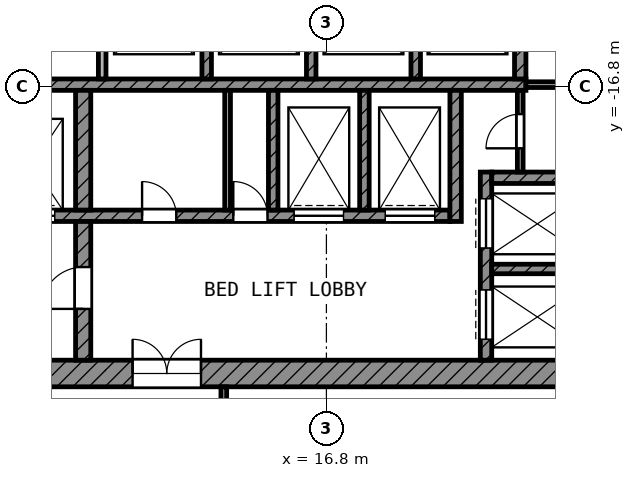
"""IFC4 building model, lengths in metres.
Left out: names, types, materials, properties, quantities, classifications, styles, units other than length and angle.
Written with IfcOpenShell. Run it as: python <this file> out.ifc"""

import sys

from ifc_helpers import new_model, si_unit, direction, frame, frame_2d, origin, place, context, subcontext, project, spatial, rectangle, extrude, element, fill, save


model = new_model("IFC4")
c1 = context("Model", 3, precision=1e-05, world=origin(), true_north=direction((0.0, 1.0)))
c2 = subcontext(c1, "Body", "Model", "MODEL_VIEW")
j1 = project(units=[si_unit("LENGTHUNIT", "METRE"), si_unit("PLANEANGLEUNIT", "RADIAN")], contexts=[c1])
p1 = place(None, origin())
s1 = spatial("IfcSite", under=j1, at=p1, CompositionType="ELEMENT")
p2 = place(p1, origin())
s2 = spatial("IfcBuilding", under=s1, at=p2, CompositionType="ELEMENT")
p3 = place(p2, frame((0.0, 0.0, 328.0)))
s3 = spatial("IfcBuildingStorey", under=s2, at=p3, CompositionType="ELEMENT", Elevation=328.0)
p4 = place(p3, frame((5.4, -24.35, 0.0), z_axis=(0.0, 0.0, 1.0), x_axis=(1.0, 0.0, 0.0)))
e1 = element("IfcWall", 1, at=p4, inside=s3, PredefinedType="SHEAR", context=c2, shape_type="SweptSolid", body=[
    extrude(rectangle(XDim=18.6, YDim=0.7, at=frame_2d((9.3, 0.0))), origin(), (0.0, 0.0, 1.0), 3.78),
])
p5 = place(p4, frame((6.3, 0.0, 0.0)))
e2 = element("IfcOpeningElement", 2, at=p5, cuts=e1, PredefinedType="OPENING", context=c2, shape_type="SweptSolid", body=[
    extrude(rectangle(XDim=1.8, YDim=2.1, at=frame_2d((0.9, 1.05))), frame((0.0, 0.36, 0.0), z_axis=(0.0, -1.0, 0.0), x_axis=(1.0, 0.0, 0.0)), (0.0, 0.0, 1.0), 0.72),
])
p6 = place(p3, frame((5.4, -16.75, 0.0), z_axis=(0.0, 0.0, 1.0), x_axis=(1.0, 0.0, 0.0)))
e3 = element("IfcWall", 3, at=p6, inside=s3, PredefinedType="SHEAR", context=c2, shape_type="SweptSolid", body=[
    extrude(rectangle(XDim=16.65, YDim=0.3, at=frame_2d((8.325, 0.0))), origin(), (0.0, 0.0, 1.0), 3.78),
])
p7 = place(p3, frame((5.4, -20.2, 0.0), z_axis=(0.0, 0.0, 1.0), x_axis=(1.0, 0.0, 0.0)))
e4 = element("IfcWall", 4, at=p7, inside=s3, PredefinedType="SHEAR", context=c2, shape_type="SweptSolid", body=[
    extrude(rectangle(XDim=14.65, YDim=0.3, at=frame_2d((7.325, 0.0))), origin(), (0.0, 0.0, 1.0), 3.78),
])
p8 = place(p7, frame((10.55, 0.0, 0.0)))
e5 = element("IfcOpeningElement", 5, at=p8, cuts=e4, PredefinedType="OPENING", context=c2, shape_type="SweptSolid", body=[
    extrude(rectangle(XDim=1.3, YDim=2.1, at=frame_2d((0.65, 1.05))), frame((0.0, 0.16, 0.0), z_axis=(0.0, -1.0, 0.0), x_axis=(1.0, 0.0, 0.0)), (0.0, 0.0, 1.0), 0.32),
])
p9 = place(p7, frame((12.95, 0.0, 0.0)))
e6 = element("IfcOpeningElement", 6, at=p9, cuts=e4, PredefinedType="OPENING", context=c2, shape_type="SweptSolid", body=[
    extrude(rectangle(XDim=1.3, YDim=2.1, at=frame_2d((0.65, 1.05))), frame((0.0, 0.16, 0.0), z_axis=(0.0, -1.0, 0.0), x_axis=(1.0, 0.0, 0.0)), (0.0, 0.0, 1.0), 0.32),
])
p10 = place(p7, frame((0.55, 0.0, 0.0)))
e7 = element("IfcOpeningElement", 7, at=p10, cuts=e4, PredefinedType="OPENING", context=c2, shape_type="SweptSolid", body=[
    extrude(rectangle(XDim=1.3, YDim=2.1, at=frame_2d((0.65, 1.05))), frame((0.0, 0.16, 0.0), z_axis=(0.0, -1.0, 0.0), x_axis=(1.0, 0.0, 0.0)), (0.0, 0.0, 1.0), 0.32),
])
p11 = place(p7, frame((2.95, 0.0, 0.0)))
e8 = element("IfcOpeningElement", 8, at=p11, cuts=e4, PredefinedType="OPENING", context=c2, shape_type="SweptSolid", body=[
    extrude(rectangle(XDim=1.3, YDim=2.1, at=frame_2d((0.65, 1.05))), frame((0.0, 0.16, 0.0), z_axis=(0.0, -1.0, 0.0), x_axis=(1.0, 0.0, 0.0)), (0.0, 0.0, 1.0), 0.32),
])
p12 = place(p7, frame((6.55, 0.0, 0.0)))
e9 = element("IfcOpeningElement", 9, at=p12, cuts=e4, PredefinedType="OPENING", context=c2, shape_type="SweptSolid", body=[
    extrude(rectangle(XDim=0.9, YDim=2.1, at=frame_2d((0.45, 1.05))), frame((0.0, 0.16, 0.0), z_axis=(0.0, -1.0, 0.0), x_axis=(1.0, 0.0, 0.0)), (0.0, 0.0, 1.0), 0.32),
])
p13 = place(p7, frame((8.95, 0.0, 0.0)))
e10 = element("IfcOpeningElement", 10, at=p13, cuts=e4, PredefinedType="OPENING", context=c2, shape_type="SweptSolid", body=[
    extrude(rectangle(XDim=0.9, YDim=2.1, at=frame_2d((0.45, 1.05))), frame((0.0, 0.16, 0.0), z_axis=(0.0, -1.0, 0.0), x_axis=(1.0, 0.0, 0.0)), (0.0, 0.0, 1.0), 0.32),
])
p14 = place(p3, frame((10.4, -24.0, 0.0), z_axis=(0.0, 0.0, 1.0), x_axis=(0.0, 1.0, 0.0)))
e11 = element("IfcWall", 11, at=p14, inside=s3, PredefinedType="SHEAR", context=c2, shape_type="SweptSolid", body=[
    extrude(rectangle(XDim=3.65, YDim=0.4, at=frame_2d((1.825, 0.0))), origin(), (0.0, 0.0, 1.0), 3.78),
])
p15 = place(p14, frame((1.35, 0.0, 0.0)))
e12 = element("IfcOpeningElement", 12, at=p15, cuts=e11, PredefinedType="OPENING", context=c2, shape_type="SweptSolid", body=[
    extrude(rectangle(XDim=1.1, YDim=2.1, at=frame_2d((0.55, 1.05))), frame((0.0, 0.21, 0.0), z_axis=(0.0, -1.0, 0.0), x_axis=(1.0, 0.0, 0.0)), (0.0, 0.0, 1.0), 0.42),
])
p16 = place(p3, frame((10.4, -20.05, 0.0), z_axis=(0.0, 0.0, 1.0), x_axis=(0.0, 1.0, 0.0)))
e13 = element("IfcWall", 13, at=p16, inside=s3, PredefinedType="SHEAR", context=c2, shape_type="SweptSolid", body=[
    extrude(rectangle(XDim=3.15, YDim=0.4, at=frame_2d((1.575, 0.0))), origin(), (0.0, 0.0, 1.0), 3.78),
])
p17 = place(p3, frame((20.2, -20.35, 0.0), z_axis=(0.0, 0.0, 1.0), x_axis=(0.0, 1.0, 0.0)))
e14 = element("IfcWall", 14, at=p17, inside=s3, PredefinedType="SHEAR", context=c2, shape_type="SweptSolid", body=[
    extrude(rectangle(XDim=3.45, YDim=0.3, at=frame_2d((1.725, 0.0))), origin(), (0.0, 0.0, 1.0), 3.78),
])
p18 = place(p3, frame((21.9, -16.6, 0.0), z_axis=(0.0, 0.0, 1.0), x_axis=(0.0, 1.0, 0.0)))
e15 = element("IfcWall", 15, at=p18, inside=s3, PredefinedType="SHEAR", context=c2, shape_type="SweptSolid", body=[
    extrude(rectangle(XDim=2.35, YDim=0.3, at=frame_2d((1.175, 0.0))), origin(), (0.0, 0.0, 1.0), 3.78),
])
p19 = place(p3, frame((21.15, -19.2, 0.0), z_axis=(0.0, 0.0, 1.0), x_axis=(1.0, 0.0, 0.0)))
e16 = element("IfcWall", 16, at=p19, inside=s3, PredefinedType="SHEAR", context=c2, shape_type="SweptSolid", body=[
    extrude(rectangle(XDim=2.85, YDim=0.3, at=frame_2d((1.425, 0.0))), origin(), (0.0, 0.0, 1.0), 3.78),
])
p20 = place(p3, frame((21.0, -24.0, 0.0), z_axis=(0.0, 0.0, 1.0), x_axis=(0.0, 1.0, 0.0)))
e17 = element("IfcWall", 17, at=p20, inside=s3, PredefinedType="SHEAR", context=c2, shape_type="SweptSolid", body=[
    extrude(rectangle(XDim=4.95, YDim=0.3, at=frame_2d((2.475, 0.0))), origin(), (0.0, 0.0, 1.0), 3.78),
])
p21 = place(p20, frame((2.95, 0.0, 0.0)))
e18 = element("IfcOpeningElement", 18, at=p21, cuts=e17, PredefinedType="OPENING", context=c2, shape_type="SweptSolid", body=[
    extrude(rectangle(XDim=1.3, YDim=2.1, at=frame_2d((0.65, 1.05))), frame((0.0, 0.16, 0.0), z_axis=(0.0, -1.0, 0.0), x_axis=(1.0, 0.0, 0.0)), (0.0, 0.0, 1.0), 0.32),
])
p22 = place(p20, frame((0.55, 0.0, 0.0)))
e19 = element("IfcOpeningElement", 19, at=p22, cuts=e17, PredefinedType="OPENING", context=c2, shape_type="SweptSolid", body=[
    extrude(rectangle(XDim=1.3, YDim=2.1, at=frame_2d((0.65, 1.05))), frame((0.0, 0.16, 0.0), z_axis=(0.0, -1.0, 0.0), x_axis=(1.0, 0.0, 0.0)), (0.0, 0.0, 1.0), 0.32),
])
p23 = place(p3, frame((21.15, -21.6, 0.0), z_axis=(0.0, 0.0, 1.0), x_axis=(1.0, 0.0, 0.0)))
e20 = element("IfcWall", 20, at=p23, inside=s3, PredefinedType="SHEAR", context=c2, shape_type="SweptSolid", body=[
    extrude(rectangle(XDim=2.85, YDim=0.25, at=frame_2d((1.425, 0.0))), origin(), (0.0, 0.0, 1.0), 3.78),
])
for number, where, z_axis, x_axis in (
    (21, (15.4, -20.05, 0.0), (0.0, 0.0, 1.0), (0.0, 1.0, 0.0)),
    (22, (17.8, -20.05, 0.0), (0.0, 0.0, 1.0), (0.0, 1.0, 0.0)),
):
    element("IfcWall", number, at=place(p3, frame(where, z_axis=z_axis, x_axis=x_axis)), inside=s3, PredefinedType="SHEAR", context=c2, shape_type="SweptSolid", body=[
        extrude(rectangle(XDim=3.15, YDim=0.25, at=frame_2d((1.575, 0.0))), origin(), (0.0, 0.0, 1.0), 3.78),
    ])
p24 = place(p3, frame((10.9, -16.6, 0.0), z_axis=(0.0, 0.0, 1.0), x_axis=(0.0, 1.0, 0.0)))
e23 = element("IfcWall", 23, at=p24, inside=s3, PredefinedType="PARTITIONING", context=c2, shape_type="SweptSolid", body=[
    extrude(rectangle(XDim=2.35, YDim=0.2, at=frame_2d((1.175, 0.0))), origin(), (0.0, 0.0, 1.0), 3.78),
])
for number, where, z_axis, x_axis in (
    (24, (13.65, -16.6, 0.0), (0.0, 0.0, 1.0), (0.0, 1.0, 0.0)),
    (25, (16.4, -16.6, 0.0), (0.0, 0.0, 1.0), (0.0, 1.0, 0.0)),
    (26, (19.15, -16.6, 0.0), (0.0, 0.0, 1.0), (0.0, 1.0, 0.0)),
):
    element("IfcWall", number, at=place(p3, frame(where, z_axis=z_axis, x_axis=x_axis)), inside=s3, PredefinedType="SHEAR", context=c2, shape_type="SweptSolid", body=[
        extrude(rectangle(XDim=2.35, YDim=0.25, at=frame_2d((1.175, 0.0))), origin(), (0.0, 0.0, 1.0), 3.78),
    ])
p25 = place(p3, frame((21.9, -19.05, 0.0), z_axis=(0.0, 0.0, 1.0), x_axis=(0.0, 1.0, 0.0)))
e27 = element("IfcWall", 27, at=p25, inside=s3, PredefinedType="PARTITIONING", context=c2, shape_type="SweptSolid", body=[
    extrude(rectangle(XDim=2.15, YDim=0.15, at=frame_2d((1.075, 0.0))), origin(), (0.0, 0.0, 1.0), 3.78),
])
p26 = place(p25, frame((0.625, 0.0, 0.0)))
e28 = element("IfcOpeningElement", 28, at=p26, cuts=e27, PredefinedType="OPENING", context=c2, shape_type="SweptSolid", body=[
    extrude(rectangle(XDim=0.9, YDim=2.1, at=frame_2d((0.45, 1.05))), frame((0.0, 0.085, 0.0), z_axis=(0.0, -1.0, 0.0), x_axis=(1.0, 0.0, 0.0)), (0.0, 0.0, 1.0), 0.17),
])
p27 = place(p3, frame((22.05, -16.75, 0.0), z_axis=(0.0, 0.0, 1.0), x_axis=(1.0, 0.0, 0.0)))
e29 = element("IfcWall", 29, at=p27, inside=s3, PredefinedType="PARTITIONING", context=c2, shape_type="SweptSolid", body=[
    extrude(rectangle(XDim=1.95, YDim=0.15, at=frame_2d((0.975, 0.0))), origin(), (0.0, 0.0, 1.0), 3.78),
])
p28 = place(p3, frame((14.2, -20.05, 0.0), z_axis=(0.0, 0.0, 1.0), x_axis=(0.0, 1.0, 0.0)))
e30 = element("IfcWall", 30, at=p28, inside=s3, PredefinedType="PARTITIONING", context=c2, shape_type="SweptSolid", body=[
    extrude(rectangle(XDim=3.15, YDim=0.15, at=frame_2d((1.575, 0.0))), origin(), (0.0, 0.0, 1.0), 3.78),
])
p29 = place(p3, frame((14.1, -29.325, 0.0), z_axis=(0.0, 0.0, 1.0), x_axis=(0.0, 1.0, 0.0)))
e31 = element("IfcWall", 31, at=p29, inside=s3, PredefinedType="PARTITIONING", context=c2, shape_type="SweptSolid", body=[
    extrude(rectangle(XDim=4.625, YDim=0.15, at=frame_2d((2.312, 0.0))), origin(), (0.0, 0.0, 1.0), 3.78),
])
p30 = place(p21, origin())
e32 = element("IfcDoor", 32, at=p30, inside=s3, OperationType="DOUBLE_DOOR_SLIDING", PredefinedType="DOOR", context=c2, shape_type="SweptSolid", body=[
    extrude(rectangle(XDim=1.3, YDim=2.1, at=frame_2d((0.65, 1.05))), frame((0.0, 0.025, 0.0), z_axis=(0.0, -1.0, 0.0), x_axis=(1.0, 0.0, 0.0)), (0.0, 0.0, 1.0), 0.05),
])
fill(e18, e32)
p31 = place(p22, origin())
e33 = element("IfcDoor", 33, at=p31, inside=s3, OperationType="DOUBLE_DOOR_SLIDING", PredefinedType="DOOR", context=c2, shape_type="SweptSolid", body=[
    extrude(rectangle(XDim=1.3, YDim=2.1, at=frame_2d((0.65, 1.05))), frame((0.0, 0.025, 0.0), z_axis=(0.0, -1.0, 0.0), x_axis=(1.0, 0.0, 0.0)), (0.0, 0.0, 1.0), 0.05),
])
fill(e19, e33)
p32 = place(p8, origin())
e34 = element("IfcDoor", 34, at=p32, inside=s3, OperationType="DOUBLE_DOOR_SLIDING", PredefinedType="DOOR", context=c2, shape_type="SweptSolid", body=[
    extrude(rectangle(XDim=1.3, YDim=2.1, at=frame_2d((0.65, 1.05))), frame((0.0, 0.025, 0.0), z_axis=(0.0, -1.0, 0.0), x_axis=(1.0, 0.0, 0.0)), (0.0, 0.0, 1.0), 0.05),
])
fill(e5, e34)
p33 = place(p9, origin())
e35 = element("IfcDoor", 35, at=p33, inside=s3, OperationType="DOUBLE_DOOR_SLIDING", PredefinedType="DOOR", context=c2, shape_type="SweptSolid", body=[
    extrude(rectangle(XDim=1.3, YDim=2.1, at=frame_2d((0.65, 1.05))), frame((0.0, 0.025, 0.0), z_axis=(0.0, -1.0, 0.0), x_axis=(1.0, 0.0, 0.0)), (0.0, 0.0, 1.0), 0.05),
])
fill(e6, e35)
p34 = place(p11, origin())
e36 = element("IfcDoor", 36, at=p34, inside=s3, OperationType="DOUBLE_DOOR_SLIDING", PredefinedType="DOOR", context=c2, shape_type="SweptSolid", body=[
    extrude(rectangle(XDim=1.3, YDim=2.1, at=frame_2d((0.65, 1.05))), frame((0.0, 0.025, 0.0), z_axis=(0.0, -1.0, 0.0), x_axis=(1.0, 0.0, 0.0)), (0.0, 0.0, 1.0), 0.05),
])
fill(e8, e36)
p35 = place(p15, origin())
e37 = element("IfcDoor", 37, at=p35, inside=s3, OperationType="SINGLE_SWING_LEFT", PredefinedType="DOOR", context=c2, shape_type="SweptSolid", body=[
    extrude(rectangle(XDim=1.1, YDim=2.1, at=frame_2d((0.55, 1.05))), frame((0.0, 0.025, 0.0), z_axis=(0.0, -1.0, 0.0), x_axis=(1.0, 0.0, 0.0)), (0.0, 0.0, 1.0), 0.05),
])
fill(e12, e37)
p36 = place(p5, origin())
e38 = element("IfcDoor", 38, at=p36, inside=s3, OperationType="DOUBLE_DOOR_SINGLE_SWING", PredefinedType="DOOR", context=c2, shape_type="SweptSolid", body=[
    extrude(rectangle(XDim=1.8, YDim=2.1, at=frame_2d((0.9, 1.05))), frame((0.0, 0.025, 0.0), z_axis=(0.0, -1.0, 0.0), x_axis=(1.0, 0.0, 0.0)), (0.0, 0.0, 1.0), 0.05),
])
fill(e2, e38)
p37 = place(p26, origin())
e39 = element("IfcDoor", 39, at=p37, inside=s3, OperationType="SINGLE_SWING_LEFT", PredefinedType="DOOR", context=c2, shape_type="SweptSolid", body=[
    extrude(rectangle(XDim=0.9, YDim=2.1, at=frame_2d((0.45, 1.05))), frame((0.0, 0.025, 0.0), z_axis=(0.0, -1.0, 0.0), x_axis=(1.0, 0.0, 0.0)), (0.0, 0.0, 1.0), 0.05),
])
fill(e28, e39)
p38 = place(p12, origin())
e40 = element("IfcDoor", 40, at=p38, inside=s3, OperationType="SINGLE_SWING_LEFT", PredefinedType="DOOR", context=c2, shape_type="SweptSolid", body=[
    extrude(rectangle(XDim=0.9, YDim=2.1, at=frame_2d((0.45, 1.05))), frame((0.0, 0.025, 0.0), z_axis=(0.0, -1.0, 0.0), x_axis=(1.0, 0.0, 0.0)), (0.0, 0.0, 1.0), 0.05),
])
fill(e9, e40)
p39 = place(p13, origin())
e41 = element("IfcDoor", 41, at=p39, inside=s3, OperationType="SINGLE_SWING_LEFT", PredefinedType="DOOR", context=c2, shape_type="SweptSolid", body=[
    extrude(rectangle(XDim=0.9, YDim=2.1, at=frame_2d((0.45, 1.05))), frame((0.0, 0.025, 0.0), z_axis=(0.0, -1.0, 0.0), x_axis=(1.0, 0.0, 0.0)), (0.0, 0.0, 1.0), 0.05),
])
fill(e10, e41)
save(model, sys.argv[1])
